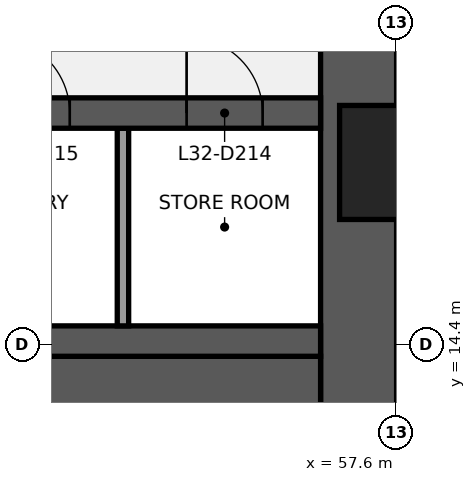
"""IFC4 building model, lengths in metres.
Left out: names, types, materials, properties, quantities, classifications, styles, units other than length and angle.
Written with IfcOpenShell. Run it as: python <this file> out.ifc"""

import sys

from ifc_helpers import new_model, si_unit, direction, frame, frame_2d, origin, place, context, subcontext, project, spatial, rectangle, extrude, element, fill, save


model = new_model("IFC4")
c1 = context("Model", 3, precision=1e-05, world=origin(), true_north=direction((0.0, 1.0)))
c2 = subcontext(c1, "Body", "Model", "MODEL_VIEW")
j1 = project(units=[si_unit("LENGTHUNIT", "METRE"), si_unit("PLANEANGLEUNIT", "RADIAN")], contexts=[c1])
p1 = place(None, origin())
s1 = spatial("IfcSite", under=j1, at=p1, CompositionType="ELEMENT")
p2 = place(p1, origin())
s2 = spatial("IfcBuilding", under=s1, at=p2, CompositionType="ELEMENT")
p3 = place(p2, frame((0.0, 0.0, 148.1)))
s3 = spatial("IfcBuildingStorey", under=s2, at=p3, CompositionType="ELEMENT", Elevation=148.1)
p4 = place(p3, frame((57.1, 38.4, 0.0), z_axis=(0.0, 0.0, 1.0), x_axis=(0.0, -1.0, 0.0)))
e1 = element("IfcWall", 1, at=p4, inside=s3, PredefinedType="SHEAR", context=c2, shape_type="SweptSolid", body=[
    extrude(rectangle(XDim=28.8, YDim=1.0, at=frame_2d((14.4, 0.0))), origin(), (0.0, 0.0, 1.0), 3.84),
])
p5 = place(p4, frame((18.45, 0.0, 0.9)))
e2 = element("IfcOpeningElement", 2, at=p5, cuts=e1, PredefinedType="OPENING", context=c2, shape_type="SweptSolid", body=[
    extrude(rectangle(XDim=1.5, YDim=1.5, at=frame_2d((0.75, 0.75))), frame((0.0, 0.51, 0.0), z_axis=(0.0, -1.0, 0.0), x_axis=(1.0, 0.0, 0.0)), (0.0, 0.0, 1.0), 1.02),
])
p6 = place(p4, frame((8.85, 0.0, 0.9)))
e3 = element("IfcOpeningElement", 3, at=p6, cuts=e1, PredefinedType="OPENING", context=c2, shape_type="SweptSolid", body=[
    extrude(rectangle(XDim=1.5, YDim=1.5, at=frame_2d((0.75, 0.75))), frame((0.0, 0.51, 0.0), z_axis=(0.0, -1.0, 0.0), x_axis=(1.0, 0.0, 0.0)), (0.0, 0.0, 1.0), 1.02),
])
p7 = place(p3, frame((51.35, 12.425, 0.0), z_axis=(0.0, 0.0, 1.0), x_axis=(1.0, 0.0, 0.0)))
e4 = element("IfcWall", 4, at=p7, inside=s3, PredefinedType="SHEAR", context=c2, shape_type="SweptSolid", body=[
    extrude(rectangle(XDim=5.25, YDim=3.65, at=frame_2d((2.625, 0.0))), origin(), (0.0, 0.0, 1.0), 3.84),
])
p8 = place(p3, frame((39.4, 14.45, 0.0), z_axis=(0.0, 0.0, 1.0), x_axis=(1.0, 0.0, 0.0)))
e5 = element("IfcWall", 5, at=p8, inside=s3, PredefinedType="SHEAR", context=c2, shape_type="SweptSolid", body=[
    extrude(rectangle(XDim=17.2, YDim=0.4, at=frame_2d((8.6, 0.0))), origin(), (0.0, 0.0, 1.0), 3.84),
])
p9 = place(p3, frame((54.0, 14.65, 0.0), z_axis=(0.0, 0.0, 1.0), x_axis=(0.0, 1.0, 0.0)))
e6 = element("IfcWall", 6, at=p9, inside=s3, PredefinedType="PARTITIONING", context=c2, shape_type="SweptSolid", body=[
    extrude(rectangle(XDim=2.6, YDim=0.15, at=frame_2d((1.3, 0.0))), origin(), (0.0, 0.0, 1.0), 3.84),
])
p10 = place(p3, frame((39.4, 17.45, 0.0), z_axis=(0.0, 0.0, 1.0), x_axis=(1.0, 0.0, 0.0)))
e7 = element("IfcWall", 7, at=p10, inside=s3, PredefinedType="SHEAR", context=c2, shape_type="SweptSolid", body=[
    extrude(rectangle(XDim=17.2, YDim=0.4, at=frame_2d((8.6, 0.0))), origin(), (0.0, 0.0, 1.0), 3.84),
])
p11 = place(p10, frame((15.438, 0.0, 0.0)))
e8 = element("IfcOpeningElement", 8, at=p11, cuts=e7, PredefinedType="OPENING", context=c2, shape_type="SweptSolid", body=[
    extrude(rectangle(XDim=1.0, YDim=2.1, at=frame_2d((0.5, 1.05))), frame((0.0, 0.21, 0.0), z_axis=(0.0, -1.0, 0.0), x_axis=(1.0, 0.0, 0.0)), (0.0, 0.0, 1.0), 0.42),
])
p12 = place(p10, frame((12.9, 0.0, 0.0)))
e9 = element("IfcOpeningElement", 9, at=p12, cuts=e7, PredefinedType="OPENING", context=c2, shape_type="SweptSolid", body=[
    extrude(rectangle(XDim=1.0, YDim=2.1, at=frame_2d((0.5, 1.05))), frame((0.0, 0.21, 0.0), z_axis=(0.0, -1.0, 0.0), x_axis=(1.0, 0.0, 0.0)), (0.0, 0.0, 1.0), 0.42),
])
p13 = place(p10, frame((8.7, 0.0, 0.0)))
e10 = element("IfcOpeningElement", 10, at=p13, cuts=e7, PredefinedType="OPENING", context=c2, shape_type="SweptSolid", body=[
    extrude(rectangle(XDim=1.0, YDim=2.1, at=frame_2d((0.5, 1.05))), frame((0.0, 0.21, 0.0), z_axis=(0.0, -1.0, 0.0), x_axis=(1.0, 0.0, 0.0)), (0.0, 0.0, 1.0), 0.42),
])
p14 = place(p10, frame((4.2, 0.0, 0.0)))
e11 = element("IfcOpeningElement", 11, at=p14, cuts=e7, PredefinedType="OPENING", context=c2, shape_type="SweptSolid", body=[
    extrude(rectangle(XDim=1.0, YDim=2.1, at=frame_2d((0.5, 1.05))), frame((0.0, 0.21, 0.0), z_axis=(0.0, -1.0, 0.0), x_axis=(1.0, 0.0, 0.0)), (0.0, 0.0, 1.0), 0.42),
])
p15 = place(p10, frame((1.062, 0.0, 0.0)))
e12 = element("IfcOpeningElement", 12, at=p15, cuts=e7, PredefinedType="OPENING", context=c2, shape_type="SweptSolid", body=[
    extrude(rectangle(XDim=1.0, YDim=2.1, at=frame_2d((0.5, 1.05))), frame((0.0, 0.21, 0.0), z_axis=(0.0, -1.0, 0.0), x_axis=(1.0, 0.0, 0.0)), (0.0, 0.0, 1.0), 0.42),
])
p16 = place(p11, origin())
e13 = element("IfcDoor", 13, at=p16, inside=s3, OperationType="SINGLE_SWING_LEFT", PredefinedType="DOOR", context=c2, shape_type="SweptSolid", body=[
    extrude(rectangle(XDim=1.0, YDim=2.1, at=frame_2d((0.5, 1.05))), frame((0.0, 0.025, 0.0), z_axis=(0.0, -1.0, 0.0), x_axis=(1.0, 0.0, 0.0)), (0.0, 0.0, 1.0), 0.05),
])
fill(e8, e13)
p17 = place(p12, origin())
e14 = element("IfcDoor", 14, at=p17, inside=s3, OperationType="SINGLE_SWING_LEFT", PredefinedType="DOOR", context=c2, shape_type="SweptSolid", body=[
    extrude(rectangle(XDim=1.0, YDim=2.1, at=frame_2d((0.5, 1.05))), frame((0.0, 0.025, 0.0), z_axis=(0.0, -1.0, 0.0), x_axis=(1.0, 0.0, 0.0)), (0.0, 0.0, 1.0), 0.05),
])
fill(e9, e14)
save(model, sys.argv[1])
